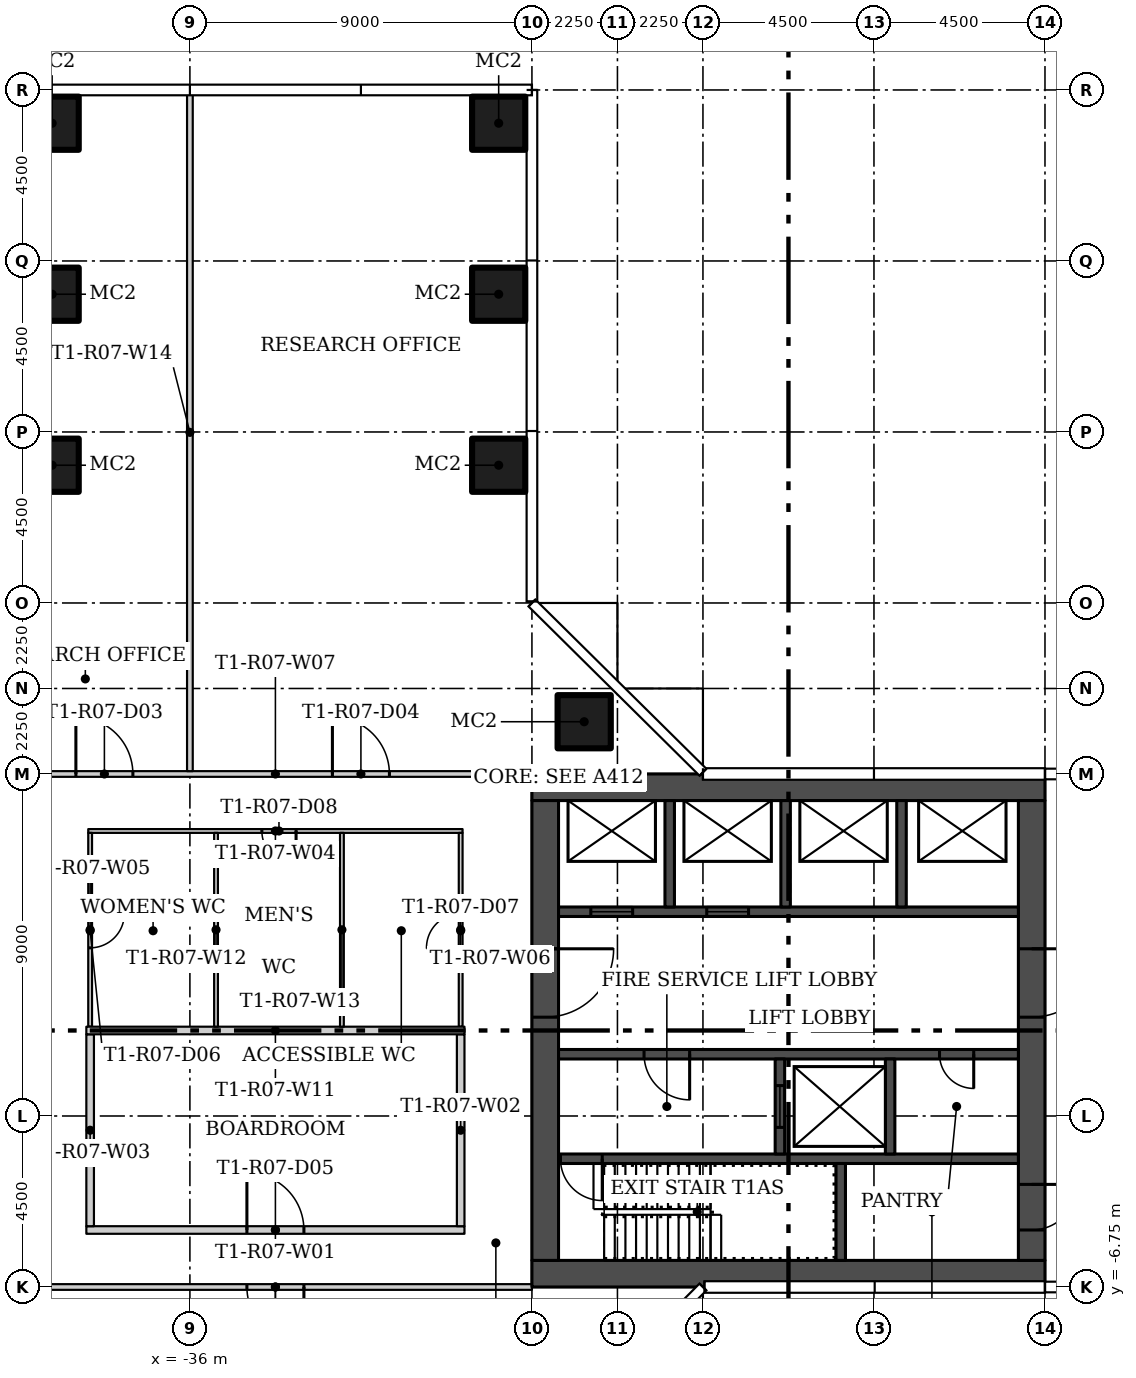
"""IFC4 building model, lengths in metres.
Left out: names, types, materials, properties, quantities, classifications, styles, units other than length and angle.
Written with IfcOpenShell. Run it as: python <this file> out.ifc"""

import sys

from ifc_helpers import new_model, si_unit, direction, frame, frame_2d, origin, origin_2d, place, context, subcontext, project, spatial, rectangle, hollow_rectangle, extrude, element, fill, save


model = new_model("IFC4")
c1 = context("Model", 3, precision=1e-05, world=origin(), true_north=direction((0.0, 1.0)))
c2 = subcontext(c1, "Body", "Model", "MODEL_VIEW")
j1 = project(units=[si_unit("LENGTHUNIT", "METRE"), si_unit("PLANEANGLEUNIT", "RADIAN")], contexts=[c1])
p1 = place(None, origin())
s1 = spatial("IfcSite", under=j1, at=p1, CompositionType="ELEMENT")
p2 = place(p1, origin())
s2 = spatial("IfcBuilding", under=s1, at=p2, CompositionType="ELEMENT")
p3 = place(p2, frame((0.0, 0.0, 69.3)))
s3 = spatial("IfcBuildingStorey", under=s2, at=p3, CompositionType="ELEMENT", Elevation=69.3)
for number, where in (
    (1, (-25.625, 8.125, 0.0)),
    (2, (-39.625, 14.875, 0.0)),
    (3, (-39.625, 19.375, 0.0)),
    (4, (-39.625, 23.875, 0.0)),
    (5, (-27.875, 14.875, 0.0)),
    (6, (-27.875, 19.375, 0.0)),
    (7, (-27.875, 23.875, 0.0)),
):
    element("IfcColumn", number, at=place(p3, frame(where)), inside=s3, PredefinedType="COLUMN", context=c2, shape_type="SweptSolid", body=[
        extrude(hollow_rectangle(XDim=1.4, YDim=1.4, WallThickness=0.05, at=origin_2d()), origin(), (0.0, 0.0, 1.0), 3.55),
    ])
p4 = place(p3, frame((-38.725, -5.25, 0.0)))
e8 = element("IfcWall", 8, at=p4, inside=s3, PredefinedType="PARTITIONING", context=c2, shape_type="SweptSolid", body=[
    extrude(rectangle(XDim=9.95, YDim=0.2, at=frame_2d((4.975, 0.0))), origin(), (0.0, 0.0, 1.0), 3.55),
])
p5 = place(p4, frame((4.225, 0.0, 0.0)))
e9 = element("IfcOpeningElement", 9, at=p5, cuts=e8, PredefinedType="OPENING", context=c2, shape_type="SweptSolid", body=[
    extrude(rectangle(XDim=1.5, YDim=2.4, at=frame_2d((0.75, 1.2))), frame((0.0, 0.11, 0.0), z_axis=(0.0, -1.0, 0.0), x_axis=(1.0, 0.0, 0.0)), (0.0, 0.0, 1.0), 0.22),
])
for number, where, z_axis, x_axis in (
    (10, (-28.875, -5.15, 0.0), (0.0, 0.0, 1.0), (0.0, 1.0, 0.0)),
    (11, (-38.625, -0.1, 0.0), (0.0, 0.0, 1.0), (0.0, -1.0, 0.0)),
):
    element("IfcWall", number, at=place(p3, frame(where, z_axis=z_axis, x_axis=x_axis)), inside=s3, PredefinedType="PARTITIONING", context=c2, shape_type="SweptSolid", body=[
        extrude(rectangle(XDim=5.05, YDim=0.2, at=frame_2d((2.525, 0.0))), origin(), (0.0, 0.0, 1.0), 3.55),
    ])
p6 = place(p3, frame((-28.825, 5.25, 0.0), z_axis=(0.0, 0.0, 1.0), x_axis=(-1.0, 0.0, 0.0)))
e12 = element("IfcWall", 12, at=p6, inside=s3, PredefinedType="PARTITIONING", context=c2, shape_type="SweptSolid", body=[
    extrude(rectangle(XDim=9.85, YDim=0.1, at=frame_2d((4.925, 0.0))), origin(), (0.0, 0.0, 1.0), 3.55),
])
p7 = place(p6, frame((4.381, 0.0, 0.0)))
e13 = element("IfcOpeningElement", 13, at=p7, cuts=e12, PredefinedType="OPENING", context=c2, shape_type="SweptSolid", body=[
    extrude(rectangle(XDim=0.9, YDim=2.1, at=frame_2d((0.45, 1.05))), frame((0.0, 0.06, 0.0), z_axis=(0.0, -1.0, 0.0), x_axis=(1.0, 0.0, 0.0)), (0.0, 0.0, 1.0), 0.12),
])
p8 = place(p3, frame((-38.625, 5.2, 0.0), z_axis=(0.0, 0.0, 1.0), x_axis=(0.0, -1.0, 0.0)))
e14 = element("IfcWall", 14, at=p8, inside=s3, PredefinedType="PARTITIONING", context=c2, shape_type="SweptSolid", body=[
    extrude(rectangle(XDim=5.1, YDim=0.1, at=frame_2d((2.55, 0.0))), origin(), (0.0, 0.0, 1.0), 3.55),
])
p9 = place(p8, frame((2.125, 0.0, 0.0)))
e15 = element("IfcOpeningElement", 15, at=p9, cuts=e14, PredefinedType="OPENING", context=c2, shape_type="SweptSolid", body=[
    extrude(rectangle(XDim=0.9, YDim=2.1, at=frame_2d((0.45, 1.05))), frame((0.0, 0.06, 0.0), z_axis=(0.0, -1.0, 0.0), x_axis=(1.0, 0.0, 0.0)), (0.0, 0.0, 1.0), 0.12),
])
p10 = place(p3, frame((-28.875, 0.1, 0.0), z_axis=(0.0, 0.0, 1.0), x_axis=(0.0, 1.0, 0.0)))
e16 = element("IfcWall", 16, at=p10, inside=s3, PredefinedType="PARTITIONING", context=c2, shape_type="SweptSolid", body=[
    extrude(rectangle(XDim=5.1, YDim=0.1, at=frame_2d((2.55, 0.0))), origin(), (0.0, 0.0, 1.0), 3.55),
])
p11 = place(p10, frame((2.075, 0.0, 0.0)))
e17 = element("IfcOpeningElement", 17, at=p11, cuts=e16, PredefinedType="OPENING", context=c2, shape_type="SweptSolid", body=[
    extrude(rectangle(XDim=0.9, YDim=2.1, at=frame_2d((0.45, 1.05))), frame((0.0, 0.06, 0.0), z_axis=(0.0, -1.0, 0.0), x_axis=(1.0, 0.0, 0.0)), (0.0, 0.0, 1.0), 0.12),
])
p12 = place(p3, frame((-40.5, 6.75, 0.0)))
e18 = element("IfcWall", 18, at=p12, inside=s3, PredefinedType="PARTITIONING", context=c2, shape_type="SweptSolid", body=[
    extrude(rectangle(XDim=13.5, YDim=0.15, at=frame_2d((6.75, 0.0))), origin(), (0.0, 0.0, 1.0), 3.55),
])
p13 = place(p12, frame((1.5, 0.0, 0.0)))
e19 = element("IfcOpeningElement", 19, at=p13, cuts=e18, PredefinedType="OPENING", context=c2, shape_type="SweptSolid", body=[
    extrude(rectangle(XDim=1.5, YDim=2.1, at=frame_2d((0.75, 1.05))), frame((0.0, 0.085, 0.0), z_axis=(0.0, -1.0, 0.0), x_axis=(1.0, 0.0, 0.0)), (0.0, 0.0, 1.0), 0.17),
])
p14 = place(p12, frame((8.25, 0.0, 0.0)))
e20 = element("IfcOpeningElement", 20, at=p14, cuts=e18, PredefinedType="OPENING", context=c2, shape_type="SweptSolid", body=[
    extrude(rectangle(XDim=1.5, YDim=2.1, at=frame_2d((0.75, 1.05))), frame((0.0, 0.085, 0.0), z_axis=(0.0, -1.0, 0.0), x_axis=(1.0, 0.0, 0.0)), (0.0, 0.0, 1.0), 0.17),
])
p15 = place(p3, frame((-27.0, -6.75, 0.0), z_axis=(0.0, 0.0, 1.0), x_axis=(-1.0, 0.0, 0.0)))
e21 = element("IfcWall", 21, at=p15, inside=s3, PredefinedType="PARTITIONING", context=c2, shape_type="SweptSolid", body=[
    extrude(rectangle(XDim=13.5, YDim=0.15, at=frame_2d((6.75, 0.0))), origin(), (0.0, 0.0, 1.0), 3.55),
])
p16 = place(p15, frame((6.0, 0.0, 0.0)))
e22 = element("IfcOpeningElement", 22, at=p16, cuts=e21, PredefinedType="OPENING", context=c2, shape_type="SweptSolid", body=[
    extrude(rectangle(XDim=1.5, YDim=2.1, at=frame_2d((0.75, 1.05))), frame((0.0, 0.085, 0.0), z_axis=(0.0, -1.0, 0.0), x_axis=(1.0, 0.0, 0.0)), (0.0, 0.0, 1.0), 0.17),
])
p17 = place(p3, frame((-28.775, 0.0, 0.0), z_axis=(0.0, 0.0, 1.0), x_axis=(-1.0, 0.0, 0.0)))
e23 = element("IfcWall", 23, at=p17, inside=s3, PredefinedType="PARTITIONING", context=c2, shape_type="SweptSolid", body=[
    extrude(rectangle(XDim=9.95, YDim=0.2, at=frame_2d((4.975, 0.0))), origin(), (0.0, 0.0, 1.0), 3.55),
])
for number, where, z_axis, x_axis in (
    (24, (-35.312, 0.1, 0.0), (0.0, 0.0, 1.0), (0.0, 1.0, 0.0)),
    (25, (-32.0, 0.1, 0.0), (0.0, 0.0, 1.0), (0.0, 1.0, 0.0)),
):
    element("IfcWall", number, at=place(p3, frame(where, z_axis=z_axis, x_axis=x_axis)), inside=s3, PredefinedType="PARTITIONING", context=c2, shape_type="SweptSolid", body=[
        extrude(rectangle(XDim=5.1, YDim=0.1, at=frame_2d((2.55, 0.0))), origin(), (0.0, 0.0, 1.0), 3.55),
    ])
p18 = place(p3, frame((-36.0, 6.825, 0.0), z_axis=(0.0, 0.0, 1.0), x_axis=(0.0, 1.0, 0.0)))
e26 = element("IfcWall", 26, at=p18, inside=s3, PredefinedType="PARTITIONING", context=c2, shape_type="SweptSolid", body=[
    extrude(rectangle(XDim=17.83, YDim=0.15, at=frame_2d((8.915, 0.0))), origin(), (0.0, 0.0, 1.0), 3.55),
])
for number, where in (
    (27, (-27.0, -6.4, 0.0)),
    (28, (-27.0, 6.4, 0.0)),
):
    element("IfcWall", number, at=place(p3, frame(where)), inside=s3, PredefinedType="SHEAR", context=c2, shape_type="SweptSolid", body=[
        extrude(rectangle(XDim=13.5, YDim=0.7, at=frame_2d((6.75, 0.0))), origin(), (0.0, 0.0, 1.0), 3.55),
    ])
p19 = place(p3, frame((-26.65, 6.05, 0.0), z_axis=(0.0, 0.0, 1.0), x_axis=(0.0, -1.0, 0.0)))
e29 = element("IfcWall", 29, at=p19, inside=s3, PredefinedType="SHEAR", context=c2, shape_type="SweptSolid", body=[
    extrude(rectangle(XDim=12.1, YDim=0.7, at=frame_2d((6.05, 0.0))), origin(), (0.0, 0.0, 1.0), 3.55),
])
p20 = place(p19, frame((3.9, 0.0, 0.0)))
e30 = element("IfcOpeningElement", 30, at=p20, cuts=e29, PredefinedType="OPENING", context=c2, shape_type="SweptSolid", body=[
    extrude(rectangle(XDim=1.8, YDim=2.4, at=frame_2d((0.9, 1.2))), frame((0.0, 0.36, 0.0), z_axis=(0.0, -1.0, 0.0), x_axis=(1.0, 0.0, 0.0)), (0.0, 0.0, 1.0), 0.72),
])
p21 = place(p3, frame((-13.85, 6.05, 0.0), z_axis=(0.0, 0.0, 1.0), x_axis=(0.0, -1.0, 0.0)))
e31 = element("IfcWall", 31, at=p21, inside=s3, PredefinedType="SHEAR", context=c2, shape_type="SweptSolid", body=[
    extrude(rectangle(XDim=12.1, YDim=0.7, at=frame_2d((6.05, 0.0))), origin(), (0.0, 0.0, 1.0), 3.55),
])
p22 = place(p21, frame((10.1, 0.0, 0.0)))
e32 = element("IfcOpeningElement", 32, at=p22, cuts=e31, PredefinedType="OPENING", context=c2, shape_type="SweptSolid", body=[
    extrude(rectangle(XDim=1.2, YDim=2.1, at=frame_2d((0.6, 1.05))), frame((0.0, 0.36, 0.0), z_axis=(0.0, -1.0, 0.0), x_axis=(1.0, 0.0, 0.0)), (0.0, 0.0, 1.0), 0.72),
])
p23 = place(p21, frame((3.9, 0.0, 0.0)))
e33 = element("IfcOpeningElement", 33, at=p23, cuts=e31, PredefinedType="OPENING", context=c2, shape_type="SweptSolid", body=[
    extrude(rectangle(XDim=1.8, YDim=2.4, at=frame_2d((0.9, 1.2))), frame((0.0, 0.36, 0.0), z_axis=(0.0, -1.0, 0.0), x_axis=(1.0, 0.0, 0.0)), (0.0, 0.0, 1.0), 0.72),
])
p24 = place(p3, frame((-14.2, -3.375, 0.0), z_axis=(0.0, 0.0, 1.0), x_axis=(-1.0, 0.0, 0.0)))
e34 = element("IfcWall", 34, at=p24, inside=s3, PredefinedType="SHEAR", context=c2, shape_type="SweptSolid", body=[
    extrude(rectangle(XDim=12.1, YDim=0.25, at=frame_2d((6.05, 0.0))), origin(), (0.0, 0.0, 1.0), 3.55),
])
p25 = place(p24, frame((10.95, 0.0, 0.0)))
e35 = element("IfcOpeningElement", 35, at=p25, cuts=e34, PredefinedType="OPENING", context=c2, shape_type="SweptSolid", body=[
    extrude(rectangle(XDim=1.1, YDim=2.1, at=frame_2d((0.55, 1.05))), frame((0.0, 0.135, 0.0), z_axis=(0.0, -1.0, 0.0), x_axis=(1.0, 0.0, 0.0)), (0.0, 0.0, 1.0), 0.27),
])
p26 = place(p3, frame((-18.875, -6.05, 0.0), z_axis=(0.0, 0.0, 1.0), x_axis=(0.0, 1.0, 0.0)))
e36 = element("IfcWall", 36, at=p26, inside=s3, PredefinedType="SHEAR", context=c2, shape_type="SweptSolid", body=[
    extrude(rectangle(XDim=2.55, YDim=0.25, at=frame_2d((1.275, 0.0))), origin(), (0.0, 0.0, 1.0), 3.55),
])
p27 = place(p3, frame((-14.2, -0.625, 0.0), z_axis=(0.0, 0.0, 1.0), x_axis=(-1.0, 0.0, 0.0)))
e37 = element("IfcWall", 37, at=p27, inside=s3, PredefinedType="SHEAR", context=c2, shape_type="SweptSolid", body=[
    extrude(rectangle(XDim=12.1, YDim=0.25, at=frame_2d((6.05, 0.0))), origin(), (0.0, 0.0, 1.0), 3.55),
])
p28 = place(p27, frame((8.65, 0.0, 0.0)))
e38 = element("IfcOpeningElement", 38, at=p28, cuts=e37, PredefinedType="OPENING", context=c2, shape_type="SweptSolid", body=[
    extrude(rectangle(XDim=1.2, YDim=2.1, at=frame_2d((0.6, 1.05))), frame((0.0, 0.135, 0.0), z_axis=(0.0, -1.0, 0.0), x_axis=(1.0, 0.0, 0.0)), (0.0, 0.0, 1.0), 0.27),
])
p29 = place(p27, frame((1.175, 0.0, 0.0)))
e39 = element("IfcOpeningElement", 39, at=p29, cuts=e37, PredefinedType="OPENING", context=c2, shape_type="SweptSolid", body=[
    extrude(rectangle(XDim=0.9, YDim=2.1, at=frame_2d((0.45, 1.05))), frame((0.0, 0.135, 0.0), z_axis=(0.0, -1.0, 0.0), x_axis=(1.0, 0.0, 0.0)), (0.0, 0.0, 1.0), 0.27),
])
p30 = place(p3, frame((-20.475, -3.25, 0.0), z_axis=(0.0, 0.0, 1.0), x_axis=(0.0, 1.0, 0.0)))
e40 = element("IfcWall", 40, at=p30, inside=s3, PredefinedType="SHEAR", context=c2, shape_type="SweptSolid", body=[
    extrude(rectangle(XDim=2.5, YDim=0.25, at=frame_2d((1.25, 0.0))), origin(), (0.0, 0.0, 1.0), 3.55),
])
p31 = place(p30, frame((0.7, 0.0, 0.0)))
e41 = element("IfcOpeningElement", 41, at=p31, cuts=e40, PredefinedType="OPENING", context=c2, shape_type="SweptSolid", body=[
    extrude(rectangle(XDim=1.1, YDim=2.1, at=frame_2d((0.55, 1.05))), frame((0.0, 0.135, 0.0), z_axis=(0.0, -1.0, 0.0), x_axis=(1.0, 0.0, 0.0)), (0.0, 0.0, 1.0), 0.27),
])
p32 = place(p3, frame((-17.575, -3.25, 0.0), z_axis=(0.0, 0.0, 1.0), x_axis=(0.0, 1.0, 0.0)))
e42 = element("IfcWall", 42, at=p32, inside=s3, PredefinedType="SHEAR", context=c2, shape_type="SweptSolid", body=[
    extrude(rectangle(XDim=2.5, YDim=0.25, at=frame_2d((1.25, 0.0))), origin(), (0.0, 0.0, 1.0), 3.55),
])
p33 = place(p3, frame((-26.3, 3.125, 0.0)))
e43 = element("IfcWall", 43, at=p33, inside=s3, PredefinedType="SHEAR", context=c2, shape_type="SweptSolid", body=[
    extrude(rectangle(XDim=12.1, YDim=0.25, at=frame_2d((6.05, 0.0))), origin(), (0.0, 0.0, 1.0), 3.55),
])
p34 = place(p33, frame((0.85, 0.0, 0.0)))
e44 = element("IfcOpeningElement", 44, at=p34, cuts=e43, PredefinedType="OPENING", context=c2, shape_type="SweptSolid", body=[
    extrude(rectangle(XDim=1.1, YDim=2.1, at=frame_2d((0.55, 1.05))), frame((0.0, 0.135, 0.0), z_axis=(0.0, -1.0, 0.0), x_axis=(1.0, 0.0, 0.0)), (0.0, 0.0, 1.0), 0.27),
])
p35 = place(p33, frame((3.9, 0.0, 0.0)))
e45 = element("IfcOpeningElement", 45, at=p35, cuts=e43, PredefinedType="OPENING", context=c2, shape_type="SweptSolid", body=[
    extrude(rectangle(XDim=1.1, YDim=2.1, at=frame_2d((0.55, 1.05))), frame((0.0, 0.135, 0.0), z_axis=(0.0, -1.0, 0.0), x_axis=(1.0, 0.0, 0.0)), (0.0, 0.0, 1.0), 0.27),
])
for number, where, z_axis, x_axis in (
    (46, (-23.375, 3.25, 0.0), (0.0, 0.0, 1.0), (0.0, 1.0, 0.0)),
    (47, (-20.325, 3.25, 0.0), (0.0, 0.0, 1.0), (0.0, 1.0, 0.0)),
    (48, (-17.275, 3.25, 0.0), (0.0, 0.0, 1.0), (0.0, 1.0, 0.0)),
):
    element("IfcWall", number, at=place(p3, frame(where, z_axis=z_axis, x_axis=x_axis)), inside=s3, PredefinedType="SHEAR", context=c2, shape_type="SweptSolid", body=[
        extrude(rectangle(XDim=2.8, YDim=0.25, at=frame_2d((1.4, 0.0))), origin(), (0.0, 0.0, 1.0), 3.55),
    ])
p36 = place(p13, origin())
e49 = element("IfcDoor", 49, at=p36, inside=s3, OperationType="DOUBLE_DOOR_SINGLE_SWING", PredefinedType="DOOR", context=c2, shape_type="SweptSolid", body=[
    extrude(rectangle(XDim=1.5, YDim=2.1, at=frame_2d((0.75, 1.05))), frame((0.0, 0.025, 0.0), z_axis=(0.0, -1.0, 0.0), x_axis=(1.0, 0.0, 0.0)), (0.0, 0.0, 1.0), 0.05),
])
fill(e19, e49)
p37 = place(p14, origin())
e50 = element("IfcDoor", 50, at=p37, inside=s3, OperationType="DOUBLE_DOOR_SINGLE_SWING", PredefinedType="DOOR", context=c2, shape_type="SweptSolid", body=[
    extrude(rectangle(XDim=1.5, YDim=2.1, at=frame_2d((0.75, 1.05))), frame((0.0, 0.025, 0.0), z_axis=(0.0, -1.0, 0.0), x_axis=(1.0, 0.0, 0.0)), (0.0, 0.0, 1.0), 0.05),
])
fill(e20, e50)
p38 = place(p5, origin())
e51 = element("IfcDoor", 51, at=p38, inside=s3, OperationType="DOUBLE_DOOR_SINGLE_SWING", PredefinedType="DOOR", context=c2, shape_type="SweptSolid", body=[
    extrude(rectangle(XDim=1.5, YDim=2.4, at=frame_2d((0.75, 1.2))), frame((0.0, 0.025, 0.0), z_axis=(0.0, -1.0, 0.0), x_axis=(1.0, 0.0, 0.0)), (0.0, 0.0, 1.0), 0.05),
])
fill(e9, e51)
p39 = place(p9, origin())
e52 = element("IfcDoor", 52, at=p39, inside=s3, OperationType="SINGLE_SWING_LEFT", PredefinedType="DOOR", context=c2, shape_type="SweptSolid", body=[
    extrude(rectangle(XDim=0.9, YDim=2.1, at=frame_2d((0.45, 1.05))), frame((0.0, 0.025, 0.0), z_axis=(0.0, -1.0, 0.0), x_axis=(1.0, 0.0, 0.0)), (0.0, 0.0, 1.0), 0.05),
])
fill(e15, e52)
p40 = place(p11, origin())
e53 = element("IfcDoor", 53, at=p40, inside=s3, OperationType="SINGLE_SWING_LEFT", PredefinedType="DOOR", context=c2, shape_type="SweptSolid", body=[
    extrude(rectangle(XDim=0.9, YDim=2.1, at=frame_2d((0.45, 1.05))), frame((0.0, 0.025, 0.0), z_axis=(0.0, -1.0, 0.0), x_axis=(1.0, 0.0, 0.0)), (0.0, 0.0, 1.0), 0.05),
])
fill(e17, e53)
p41 = place(p7, origin())
e54 = element("IfcDoor", 54, at=p41, inside=s3, OperationType="SINGLE_SWING_RIGHT", PredefinedType="DOOR", context=c2, shape_type="SweptSolid", body=[
    extrude(rectangle(XDim=0.9, YDim=2.1, at=frame_2d((0.45, 1.05))), frame((0.0, 0.025, 0.0), z_axis=(0.0, -1.0, 0.0), x_axis=(1.0, 0.0, 0.0)), (0.0, 0.0, 1.0), 0.05),
])
fill(e13, e54)
p42 = place(p16, origin())
e55 = element("IfcDoor", 55, at=p42, inside=s3, OperationType="DOUBLE_DOOR_SINGLE_SWING", PredefinedType="DOOR", context=c2, shape_type="SweptSolid", body=[
    extrude(rectangle(XDim=1.5, YDim=2.1, at=frame_2d((0.75, 1.05))), frame((0.0, 0.025, 0.0), z_axis=(0.0, -1.0, 0.0), x_axis=(1.0, 0.0, 0.0)), (0.0, 0.0, 1.0), 0.05),
])
fill(e22, e55)
p43 = place(p20, origin())
e56 = element("IfcDoor", 56, at=p43, inside=s3, OperationType="DOUBLE_DOOR_SINGLE_SWING", PredefinedType="DOOR", context=c2, shape_type="SweptSolid", body=[
    extrude(rectangle(XDim=1.8, YDim=2.4, at=frame_2d((0.9, 1.2))), frame((0.0, 0.025, 0.0), z_axis=(0.0, -1.0, 0.0), x_axis=(1.0, 0.0, 0.0)), (0.0, 0.0, 1.0), 0.05),
])
fill(e30, e56)
p44 = place(p22, origin())
e57 = element("IfcDoor", 57, at=p44, inside=s3, OperationType="SINGLE_SWING_RIGHT", PredefinedType="DOOR", context=c2, shape_type="SweptSolid", body=[
    extrude(rectangle(XDim=1.2, YDim=2.1, at=frame_2d((0.6, 1.05))), frame((0.0, 0.025, 0.0), z_axis=(0.0, -1.0, 0.0), x_axis=(1.0, 0.0, 0.0)), (0.0, 0.0, 1.0), 0.05),
])
fill(e32, e57)
p45 = place(p23, origin())
e58 = element("IfcDoor", 58, at=p45, inside=s3, OperationType="DOUBLE_DOOR_SINGLE_SWING", PredefinedType="DOOR", context=c2, shape_type="SweptSolid", body=[
    extrude(rectangle(XDim=1.8, YDim=2.4, at=frame_2d((0.9, 1.2))), frame((0.0, 0.025, 0.0), z_axis=(0.0, -1.0, 0.0), x_axis=(1.0, 0.0, 0.0)), (0.0, 0.0, 1.0), 0.05),
])
fill(e33, e58)
p46 = place(p25, origin())
e59 = element("IfcDoor", 59, at=p46, inside=s3, OperationType="SINGLE_SWING_RIGHT", PredefinedType="DOOR", context=c2, shape_type="SweptSolid", body=[
    extrude(rectangle(XDim=1.1, YDim=2.1, at=frame_2d((0.55, 1.05))), frame((0.0, 0.025, 0.0), z_axis=(0.0, -1.0, 0.0), x_axis=(1.0, 0.0, 0.0)), (0.0, 0.0, 1.0), 0.05),
])
fill(e35, e59)
p47 = place(p28, origin())
e60 = element("IfcDoor", 60, at=p47, inside=s3, OperationType="SINGLE_SWING_RIGHT", PredefinedType="DOOR", context=c2, shape_type="SweptSolid", body=[
    extrude(rectangle(XDim=1.2, YDim=2.1, at=frame_2d((0.6, 1.05))), frame((0.0, 0.025, 0.0), z_axis=(0.0, -1.0, 0.0), x_axis=(1.0, 0.0, 0.0)), (0.0, 0.0, 1.0), 0.05),
])
fill(e38, e60)
p48 = place(p29, origin())
e61 = element("IfcDoor", 61, at=p48, inside=s3, OperationType="SINGLE_SWING_LEFT", PredefinedType="DOOR", context=c2, shape_type="SweptSolid", body=[
    extrude(rectangle(XDim=0.9, YDim=2.1, at=frame_2d((0.45, 1.05))), frame((0.0, 0.025, 0.0), z_axis=(0.0, -1.0, 0.0), x_axis=(1.0, 0.0, 0.0)), (0.0, 0.0, 1.0), 0.05),
])
fill(e39, e61)
p49 = place(p31, origin())
e62 = element("IfcDoor", 62, at=p49, inside=s3, OperationType="SLIDING_TO_LEFT", PredefinedType="DOOR", context=c2, shape_type="SweptSolid", body=[
    extrude(rectangle(XDim=1.1, YDim=2.1, at=frame_2d((0.55, 1.05))), frame((0.0, 0.025, 0.0), z_axis=(0.0, -1.0, 0.0), x_axis=(1.0, 0.0, 0.0)), (0.0, 0.0, 1.0), 0.05),
])
fill(e41, e62)
p50 = place(p34, origin())
e63 = element("IfcDoor", 63, at=p50, inside=s3, OperationType="SLIDING_TO_LEFT", PredefinedType="DOOR", context=c2, shape_type="SweptSolid", body=[
    extrude(rectangle(XDim=1.1, YDim=2.1, at=frame_2d((0.55, 1.05))), frame((0.0, 0.025, 0.0), z_axis=(0.0, -1.0, 0.0), x_axis=(1.0, 0.0, 0.0)), (0.0, 0.0, 1.0), 0.05),
])
fill(e44, e63)
p51 = place(p35, origin())
e64 = element("IfcDoor", 64, at=p51, inside=s3, OperationType="SLIDING_TO_LEFT", PredefinedType="DOOR", context=c2, shape_type="SweptSolid", body=[
    extrude(rectangle(XDim=1.1, YDim=2.1, at=frame_2d((0.55, 1.05))), frame((0.0, 0.025, 0.0), z_axis=(0.0, -1.0, 0.0), x_axis=(1.0, 0.0, 0.0)), (0.0, 0.0, 1.0), 0.05),
])
fill(e45, e64)
save(model, sys.argv[1])
